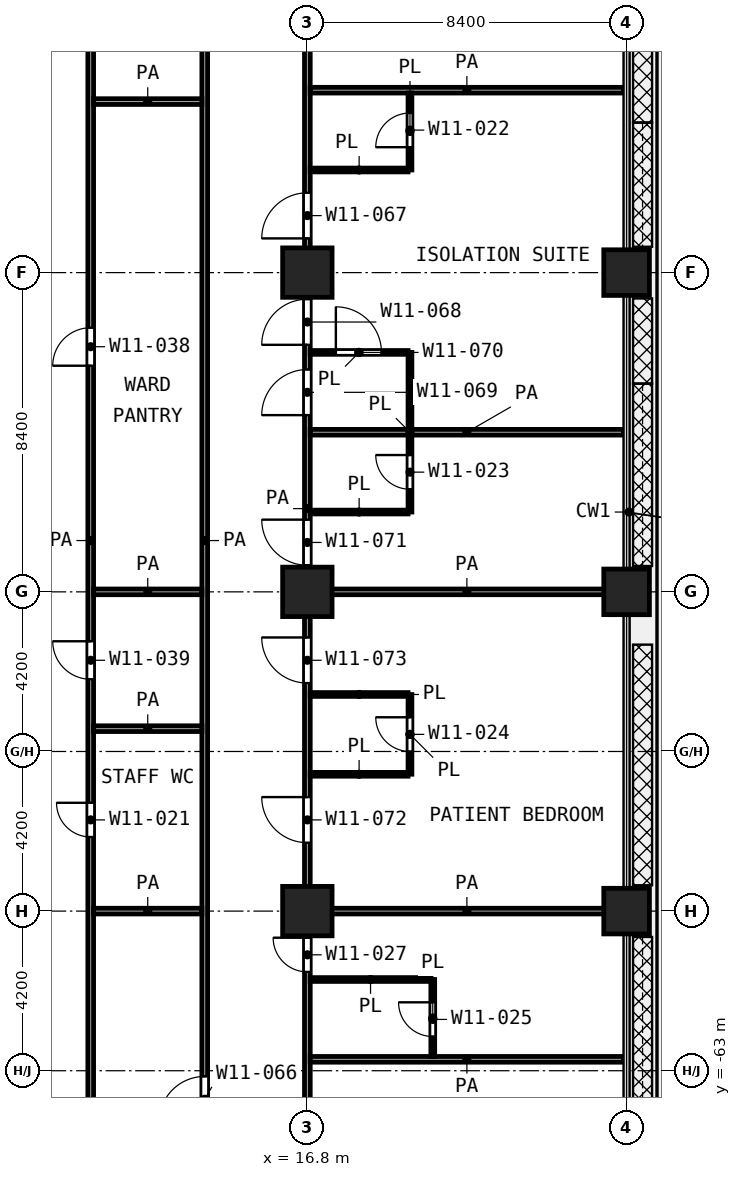
"""IFC4 building model, lengths in metres.
Left out: names, types, materials, properties, quantities, classifications, styles, units other than length and angle.
Written with IfcOpenShell. Run it as: python <this file> out.ifc"""

import sys

from ifc_helpers import new_model, si_unit, direction, frame, frame_2d, origin, origin_2d, place, context, subcontext, project, spatial, rectangle, extrude, element, fill, save


model = new_model("IFC4")
c1 = context("Model", 3, precision=1e-05, world=origin(), true_north=direction((0.0, 1.0)))
c2 = subcontext(c1, "Body", "Model", "MODEL_VIEW")
j1 = project(units=[si_unit("LENGTHUNIT", "METRE"), si_unit("PLANEANGLEUNIT", "RADIAN")], contexts=[c1])
p1 = place(None, origin())
s1 = spatial("IfcSite", under=j1, at=p1, CompositionType="ELEMENT")
p2 = place(p1, origin())
s2 = spatial("IfcBuilding", under=s1, at=p2, CompositionType="ELEMENT")
p3 = place(p2, frame((0.0, 0.0, 72.8)))
s3 = spatial("IfcBuildingStorey", under=s2, at=p3, CompositionType="ELEMENT", Elevation=72.8)
p4 = place(p3, frame((16.8, -42.0, 0.0), z_axis=(0.0, 0.0, 1.0), x_axis=(1.0, 0.0, 0.0)))
e1 = element("IfcColumn", 1, at=p4, inside=s3, PredefinedType="COLUMN", context=c2, shape_type="SweptSolid", body=[
    extrude(rectangle(XDim=1.3, YDim=1.3, at=origin_2d()), origin(), (0.0, 0.0, 1.0), 4.2),
])
p5 = place(p3, frame((25.2, -42.0, 0.0), z_axis=(0.0, 0.0, 1.0), x_axis=(1.0, 0.0, 0.0)))
e2 = element("IfcColumn", 2, at=p5, inside=s3, PredefinedType="COLUMN", context=c2, shape_type="SweptSolid", body=[
    extrude(rectangle(XDim=1.2, YDim=1.2, at=origin_2d()), origin(), (0.0, 0.0, 1.0), 4.2),
])
p6 = place(p3, frame((16.8, -50.4, 0.0), z_axis=(0.0, 0.0, 1.0), x_axis=(1.0, 0.0, 0.0)))
e3 = element("IfcColumn", 3, at=p6, inside=s3, PredefinedType="COLUMN", context=c2, shape_type="SweptSolid", body=[
    extrude(rectangle(XDim=1.3, YDim=1.3, at=origin_2d()), origin(), (0.0, 0.0, 1.0), 4.2),
])
p7 = place(p3, frame((25.2, -50.4, 0.0), z_axis=(0.0, 0.0, 1.0), x_axis=(1.0, 0.0, 0.0)))
e4 = element("IfcColumn", 4, at=p7, inside=s3, PredefinedType="COLUMN", context=c2, shape_type="SweptSolid", body=[
    extrude(rectangle(XDim=1.2, YDim=1.2, at=origin_2d()), origin(), (0.0, 0.0, 1.0), 4.2),
])
p8 = place(p3, frame((16.8, -58.8, 0.0), z_axis=(0.0, 0.0, 1.0), x_axis=(1.0, 0.0, 0.0)))
e5 = element("IfcColumn", 5, at=p8, inside=s3, PredefinedType="COLUMN", context=c2, shape_type="SweptSolid", body=[
    extrude(rectangle(XDim=1.3, YDim=1.3, at=origin_2d()), origin(), (0.0, 0.0, 1.0), 4.2),
])
p9 = place(p3, frame((25.2, -58.8, 0.0), z_axis=(0.0, 0.0, 1.0), x_axis=(1.0, 0.0, 0.0)))
e6 = element("IfcColumn", 6, at=p9, inside=s3, PredefinedType="COLUMN", context=c2, shape_type="SweptSolid", body=[
    extrude(rectangle(XDim=1.2, YDim=1.2, at=origin_2d()), origin(), (0.0, 0.0, 1.0), 4.2),
])
p10 = place(p3, frame((16.875, -60.6, 0.0), z_axis=(0.0, 0.0, 1.0), x_axis=(1.0, 0.0, 0.0)))
e7 = element("IfcWall", 7, at=p10, inside=s3, PredefinedType="PARTITIONING", context=c2, shape_type="SweptSolid", body=[
    extrude(rectangle(XDim=3.175, YDim=0.1, at=frame_2d((1.587, 0.0))), origin(), (0.0, 0.0, 1.0), 3.9),
])
p11 = place(p3, frame((16.875, -55.2, 0.0), z_axis=(0.0, 0.0, 1.0), x_axis=(1.0, 0.0, 0.0)))
e8 = element("IfcWall", 8, at=p11, inside=s3, PredefinedType="PARTITIONING", context=c2, shape_type="SweptSolid", body=[
    extrude(rectangle(XDim=2.573, YDim=0.1, at=frame_2d((1.287, 0.0))), origin(), (0.0, 0.0, 1.0), 3.9),
])
p12 = place(p3, frame((16.875, -53.1, 0.0), z_axis=(0.0, 0.0, 1.0), x_axis=(1.0, 0.0, 0.0)))
e9 = element("IfcWall", 9, at=p12, inside=s3, PredefinedType="PARTITIONING", context=c2, shape_type="SweptSolid", body=[
    extrude(rectangle(XDim=2.574, YDim=0.1, at=frame_2d((1.287, 0.0))), origin(), (0.0, 0.0, 1.0), 3.9),
])
p13 = place(p3, frame((16.875, -48.3, 0.0), z_axis=(0.0, 0.0, 1.0), x_axis=(1.0, 0.0, 0.0)))
e10 = element("IfcWall", 10, at=p13, inside=s3, PredefinedType="PARTITIONING", context=c2, shape_type="SweptSolid", body=[
    extrude(rectangle(XDim=2.575, YDim=0.1, at=frame_2d((1.288, 0.0))), origin(), (0.0, 0.0, 1.0), 3.9),
])
p14 = place(p3, frame((16.875, -44.1, 0.0), z_axis=(0.0, 0.0, 1.0), x_axis=(1.0, 0.0, 0.0)))
e11 = element("IfcWall", 11, at=p14, inside=s3, PredefinedType="PARTITIONING", context=c2, shape_type="SweptSolid", body=[
    extrude(rectangle(XDim=2.575, YDim=0.1, at=frame_2d((1.288, 0.0))), origin(), (0.0, 0.0, 1.0), 3.9),
])
p15 = place(p14, frame((0.675, 0.0, 0.0)))
e12 = element("IfcOpeningElement", 12, at=p15, cuts=e11, PredefinedType="OPENING", context=c2, shape_type="SweptSolid", body=[
    extrude(rectangle(XDim=1.2, YDim=2.1, at=frame_2d((0.6, 1.05))), frame((0.0, 0.06, 0.0), z_axis=(0.0, -1.0, 0.0), x_axis=(1.0, 0.0, 0.0)), (0.0, 0.0, 1.0), 0.12),
])
p16 = place(p3, frame((16.875, -39.3, 0.0), z_axis=(0.0, 0.0, 1.0), x_axis=(1.0, 0.0, 0.0)))
e13 = element("IfcWall", 13, at=p16, inside=s3, PredefinedType="PARTITIONING", context=c2, shape_type="SweptSolid", body=[
    extrude(rectangle(XDim=2.575, YDim=0.1, at=frame_2d((1.288, 0.0))), origin(), (0.0, 0.0, 1.0), 3.9),
])
p17 = place(p3, frame((19.5, -55.198, 0.0), z_axis=(0.0, 0.0, 1.0), x_axis=(0.0, 1.0, 0.0)))
e14 = element("IfcWall", 14, at=p17, inside=s3, PredefinedType="PARTITIONING", context=c2, shape_type="SweptSolid", body=[
    extrude(rectangle(XDim=2.096, YDim=0.1, at=frame_2d((1.048, 0.0))), origin(), (0.0, 0.0, 1.0), 3.9),
])
p18 = place(p17, frame((0.598, 0.0, 0.0)))
e15 = element("IfcOpeningElement", 15, at=p18, cuts=e14, PredefinedType="OPENING", context=c2, shape_type="SweptSolid", body=[
    extrude(rectangle(XDim=0.9, YDim=2.1, at=frame_2d((0.45, 1.05))), frame((0.0, 0.06, 0.0), z_axis=(0.0, -1.0, 0.0), x_axis=(1.0, 0.0, 0.0)), (0.0, 0.0, 1.0), 0.12),
])
p19 = place(p3, frame((19.5, -48.3, 0.0), z_axis=(0.0, 0.0, 1.0), x_axis=(0.0, 1.0, 0.0)))
e16 = element("IfcWall", 16, at=p19, inside=s3, PredefinedType="PARTITIONING", context=c2, shape_type="SweptSolid", body=[
    extrude(rectangle(XDim=4.2, YDim=0.1, at=frame_2d((2.1, 0.0))), origin(), (0.0, 0.0, 1.0), 3.9),
])
p20 = place(p19, frame((0.6, 0.0, 0.0)))
e17 = element("IfcOpeningElement", 17, at=p20, cuts=e16, PredefinedType="OPENING", context=c2, shape_type="SweptSolid", body=[
    extrude(rectangle(XDim=0.9, YDim=2.1, at=frame_2d((0.45, 1.05))), frame((0.0, 0.06, 0.0), z_axis=(0.0, -1.0, 0.0), x_axis=(1.0, 0.0, 0.0)), (0.0, 0.0, 1.0), 0.12),
])
p21 = place(p3, frame((19.5, -39.3, 0.0), z_axis=(0.0, 0.0, 1.0), x_axis=(0.0, 1.0, 0.0)))
e18 = element("IfcWall", 18, at=p21, inside=s3, PredefinedType="PARTITIONING", context=c2, shape_type="SweptSolid", body=[
    extrude(rectangle(XDim=2.025, YDim=0.1, at=frame_2d((1.013, 0.0))), origin(), (0.0, 0.0, 1.0), 3.9),
])
p22 = place(p21, frame((0.6, 0.0, 0.0)))
e19 = element("IfcOpeningElement", 19, at=p22, cuts=e18, PredefinedType="OPENING", context=c2, shape_type="SweptSolid", body=[
    extrude(rectangle(XDim=0.9, YDim=2.1, at=frame_2d((0.45, 1.05))), frame((0.0, 0.06, 0.0), z_axis=(0.0, -1.0, 0.0), x_axis=(1.0, 0.0, 0.0)), (0.0, 0.0, 1.0), 0.12),
])
p23 = place(p3, frame((20.1, -62.625, 0.0), z_axis=(0.0, 0.0, 1.0), x_axis=(0.0, 1.0, 0.0)))
e20 = element("IfcWall", 20, at=p23, inside=s3, PredefinedType="PARTITIONING", context=c2, shape_type="SweptSolid", body=[
    extrude(rectangle(XDim=2.025, YDim=0.1, at=frame_2d((1.012, 0.0))), origin(), (0.0, 0.0, 1.0), 3.9),
])
p24 = place(p23, frame((0.525, 0.0, 0.0)))
e21 = element("IfcOpeningElement", 21, at=p24, cuts=e20, PredefinedType="OPENING", context=c2, shape_type="SweptSolid", body=[
    extrude(rectangle(XDim=0.9, YDim=2.1, at=frame_2d((0.45, 1.05))), frame((0.0, 0.06, 0.0), z_axis=(0.0, -1.0, 0.0), x_axis=(1.0, 0.0, 0.0)), (0.0, 0.0, 1.0), 0.12),
])
p25 = place(p3, frame((16.875, -62.7, 0.0), z_axis=(0.0, 0.0, 1.0), x_axis=(1.0, 0.0, 0.0)))
e22 = element("IfcWall", 22, at=p25, inside=s3, PredefinedType="PARTITIONING", context=c2, shape_type="SweptSolid", body=[
    extrude(rectangle(XDim=8.245, YDim=0.15, at=frame_2d((4.123, 0.0))), origin(), (0.0, 0.0, 1.0), 3.9),
])
p26 = place(p3, frame((11.175, -58.8, 0.0), z_axis=(0.0, 0.0, 1.0), x_axis=(1.0, 0.0, 0.0)))
e23 = element("IfcWall", 23, at=p26, inside=s3, PredefinedType="PARTITIONING", context=c2, shape_type="SweptSolid", body=[
    extrude(rectangle(XDim=2.85, YDim=0.15, at=frame_2d((1.425, 0.0))), origin(), (0.0, 0.0, 1.0), 3.9),
])
p27 = place(p3, frame((16.875, -58.8, 0.0), z_axis=(0.0, 0.0, 1.0), x_axis=(1.0, 0.0, 0.0)))
e24 = element("IfcWall", 24, at=p27, inside=s3, PredefinedType="PARTITIONING", context=c2, shape_type="SweptSolid", body=[
    extrude(rectangle(XDim=8.245, YDim=0.15, at=frame_2d((4.123, 0.0))), origin(), (0.0, 0.0, 1.0), 3.9),
])
for number, where, z_axis, x_axis in (
    (25, (11.175, -54.0, 0.0), (0.0, 0.0, 1.0), (1.0, 0.0, 0.0)),
    (26, (11.175, -50.4, 0.0), (0.0, 0.0, 1.0), (1.0, 0.0, 0.0)),
):
    element("IfcWall", number, at=place(p3, frame(where, z_axis=z_axis, x_axis=x_axis)), inside=s3, PredefinedType="PARTITIONING", context=c2, shape_type="SweptSolid", body=[
        extrude(rectangle(XDim=2.85, YDim=0.15, at=frame_2d((1.425, 0.0))), origin(), (0.0, 0.0, 1.0), 3.9),
    ])
for number, where, z_axis, x_axis in (
    (27, (16.875, -50.4, 0.0), (0.0, 0.0, 1.0), (1.0, 0.0, 0.0)),
    (28, (16.875, -46.2, 0.0), (0.0, 0.0, 1.0), (1.0, 0.0, 0.0)),
):
    element("IfcWall", number, at=place(p3, frame(where, z_axis=z_axis, x_axis=x_axis)), inside=s3, PredefinedType="PARTITIONING", context=c2, shape_type="SweptSolid", body=[
        extrude(rectangle(XDim=8.245, YDim=0.15, at=frame_2d((4.123, 0.0))), origin(), (0.0, 0.0, 1.0), 3.9),
    ])
p28 = place(p3, frame((11.175, -37.5, 0.0), z_axis=(0.0, 0.0, 1.0), x_axis=(1.0, 0.0, 0.0)))
e29 = element("IfcWall", 29, at=p28, inside=s3, PredefinedType="PARTITIONING", context=c2, shape_type="SweptSolid", body=[
    extrude(rectangle(XDim=2.85, YDim=0.15, at=frame_2d((1.425, 0.0))), origin(), (0.0, 0.0, 1.0), 3.9),
])
p29 = place(p3, frame((16.875, -37.2, 0.0), z_axis=(0.0, 0.0, 1.0), x_axis=(1.0, 0.0, 0.0)))
e30 = element("IfcWall", 30, at=p29, inside=s3, PredefinedType="PARTITIONING", context=c2, shape_type="SweptSolid", body=[
    extrude(rectangle(XDim=8.245, YDim=0.15, at=frame_2d((4.123, 0.0))), origin(), (0.0, 0.0, 1.0), 3.9),
])
p30 = place(p3, frame((11.1, -68.7, 0.0), z_axis=(0.0, 0.0, 1.0), x_axis=(0.0, 1.0, 0.0)))
e31 = element("IfcWall", 31, at=p30, inside=s3, PredefinedType="PARTITIONING", context=c2, shape_type="SweptSolid", body=[
    extrude(rectangle(XDim=39.3, YDim=0.15, at=frame_2d((19.65, 0.0))), origin(), (0.0, 0.0, 1.0), 3.9),
])
p31 = place(p30, frame((34.75, 0.0, 0.0)))
e32 = element("IfcOpeningElement", 32, at=p31, cuts=e31, PredefinedType="OPENING", context=c2, shape_type="SweptSolid", body=[
    extrude(rectangle(XDim=1.0, YDim=2.1, at=frame_2d((0.5, 1.05))), frame((0.0, 0.085, 0.0), z_axis=(0.0, -1.0, 0.0), x_axis=(1.0, 0.0, 0.0)), (0.0, 0.0, 1.0), 0.17),
])
p32 = place(p30, frame((24.25, 0.0, 0.0)))
e33 = element("IfcOpeningElement", 33, at=p32, cuts=e31, PredefinedType="OPENING", context=c2, shape_type="SweptSolid", body=[
    extrude(rectangle(XDim=1.0, YDim=2.1, at=frame_2d((0.5, 1.05))), frame((0.0, 0.085, 0.0), z_axis=(0.0, -1.0, 0.0), x_axis=(1.0, 0.0, 0.0)), (0.0, 0.0, 1.0), 0.17),
])
p33 = place(p30, frame((16.0, 0.0, 0.0)))
e34 = element("IfcOpeningElement", 34, at=p33, cuts=e31, PredefinedType="OPENING", context=c2, shape_type="SweptSolid", body=[
    extrude(rectangle(XDim=1.0, YDim=2.1, at=frame_2d((0.5, 1.05))), frame((0.0, 0.085, 0.0), z_axis=(0.0, -1.0, 0.0), x_axis=(1.0, 0.0, 0.0)), (0.0, 0.0, 1.0), 0.17),
])
p34 = place(p30, frame((11.85, 0.0, 0.0)))
e35 = element("IfcOpeningElement", 35, at=p34, cuts=e31, PredefinedType="OPENING", context=c2, shape_type="SweptSolid", body=[
    extrude(rectangle(XDim=0.9, YDim=2.1, at=frame_2d((0.45, 1.05))), frame((0.0, 0.085, 0.0), z_axis=(0.0, -1.0, 0.0), x_axis=(1.0, 0.0, 0.0)), (0.0, 0.0, 1.0), 0.17),
])
p35 = place(p3, frame((14.1, -68.7, 0.0), z_axis=(0.0, 0.0, 1.0), x_axis=(0.0, 1.0, 0.0)))
e36 = element("IfcWall", 36, at=p35, inside=s3, PredefinedType="PARTITIONING", context=c2, shape_type="SweptSolid", body=[
    extrude(rectangle(XDim=39.3, YDim=0.15, at=frame_2d((19.65, 0.0))), origin(), (0.0, 0.0, 1.0), 3.9),
])
p36 = place(p35, frame((4.35, 0.0, 0.0)))
e37 = element("IfcOpeningElement", 37, at=p36, cuts=e36, PredefinedType="OPENING", context=c2, shape_type="SweptSolid", body=[
    extrude(rectangle(XDim=1.2, YDim=2.1, at=frame_2d((0.6, 1.05))), frame((0.0, 0.085, 0.0), z_axis=(0.0, -1.0, 0.0), x_axis=(1.0, 0.0, 0.0)), (0.0, 0.0, 1.0), 0.17),
])
p37 = place(p3, frame((16.8, -71.32, 0.0), z_axis=(0.0, 0.0, 1.0), x_axis=(0.0, 1.0, 0.0)))
e38 = element("IfcWall", 38, at=p37, inside=s3, PredefinedType="PARTITIONING", context=c2, shape_type="SweptSolid", body=[
    extrude(rectangle(XDim=46.22, YDim=0.15, at=frame_2d((23.11, 0.0))), origin(), (0.0, 0.0, 1.0), 3.9),
])
p38 = place(p37, frame((38.42, 0.0, 0.0)))
e39 = element("IfcOpeningElement", 39, at=p38, cuts=e38, PredefinedType="OPENING", context=c2, shape_type="SweptSolid", body=[
    extrude(rectangle(XDim=1.0, YDim=2.1, at=frame_2d((0.5, 1.05))), frame((0.0, 0.085, 0.0), z_axis=(0.0, -1.0, 0.0), x_axis=(1.0, 0.0, 0.0)), (0.0, 0.0, 1.0), 0.17),
])
p39 = place(p37, frame((30.22, 0.0, 0.0)))
e40 = element("IfcOpeningElement", 40, at=p39, cuts=e38, PredefinedType="OPENING", context=c2, shape_type="SweptSolid", body=[
    extrude(rectangle(XDim=1.2, YDim=2.1, at=frame_2d((0.6, 1.05))), frame((0.0, 0.085, 0.0), z_axis=(0.0, -1.0, 0.0), x_axis=(1.0, 0.0, 0.0)), (0.0, 0.0, 1.0), 0.17),
])
p40 = place(p37, frame((27.42, 0.0, 0.0)))
e41 = element("IfcOpeningElement", 41, at=p40, cuts=e38, PredefinedType="OPENING", context=c2, shape_type="SweptSolid", body=[
    extrude(rectangle(XDim=1.2, YDim=2.1, at=frame_2d((0.6, 1.05))), frame((0.0, 0.085, 0.0), z_axis=(0.0, -1.0, 0.0), x_axis=(1.0, 0.0, 0.0)), (0.0, 0.0, 1.0), 0.17),
])
p41 = place(p37, frame((25.57, 0.0, 0.0)))
e42 = element("IfcOpeningElement", 42, at=p41, cuts=e38, PredefinedType="OPENING", context=c2, shape_type="SweptSolid", body=[
    extrude(rectangle(XDim=1.2, YDim=2.1, at=frame_2d((0.6, 1.05))), frame((0.0, 0.085, 0.0), z_axis=(0.0, -1.0, 0.0), x_axis=(1.0, 0.0, 0.0)), (0.0, 0.0, 1.0), 0.17),
])
p42 = place(p37, frame((21.62, 0.0, 0.0)))
e43 = element("IfcOpeningElement", 43, at=p42, cuts=e38, PredefinedType="OPENING", context=c2, shape_type="SweptSolid", body=[
    extrude(rectangle(XDim=1.2, YDim=2.1, at=frame_2d((0.6, 1.05))), frame((0.0, 0.085, 0.0), z_axis=(0.0, -1.0, 0.0), x_axis=(1.0, 0.0, 0.0)), (0.0, 0.0, 1.0), 0.17),
])
p43 = place(p37, frame((14.32, 0.0, 0.0)))
e44 = element("IfcOpeningElement", 44, at=p43, cuts=e38, PredefinedType="OPENING", context=c2, shape_type="SweptSolid", body=[
    extrude(rectangle(XDim=1.2, YDim=2.1, at=frame_2d((0.6, 1.05))), frame((0.0, 0.085, 0.0), z_axis=(0.0, -1.0, 0.0), x_axis=(1.0, 0.0, 0.0)), (0.0, 0.0, 1.0), 0.17),
])
p44 = place(p37, frame((18.52, 0.0, 0.0)))
e45 = element("IfcOpeningElement", 45, at=p44, cuts=e38, PredefinedType="OPENING", context=c2, shape_type="SweptSolid", body=[
    extrude(rectangle(XDim=1.2, YDim=2.1, at=frame_2d((0.6, 1.05))), frame((0.0, 0.085, 0.0), z_axis=(0.0, -1.0, 0.0), x_axis=(1.0, 0.0, 0.0)), (0.0, 0.0, 1.0), 0.17),
])
p45 = place(p37, frame((10.92, 0.0, 0.0)))
e46 = element("IfcOpeningElement", 46, at=p45, cuts=e38, PredefinedType="OPENING", context=c2, shape_type="SweptSolid", body=[
    extrude(rectangle(XDim=0.9, YDim=2.1, at=frame_2d((0.45, 1.05))), frame((0.0, 0.085, 0.0), z_axis=(0.0, -1.0, 0.0), x_axis=(1.0, 0.0, 0.0)), (0.0, 0.0, 1.0), 0.17),
])
p46 = place(p37, frame((4.82, 0.0, 0.0)))
e47 = element("IfcOpeningElement", 47, at=p46, cuts=e38, PredefinedType="OPENING", context=c2, shape_type="SweptSolid", body=[
    extrude(rectangle(XDim=1.5, YDim=2.1, at=frame_2d((0.75, 1.05))), frame((0.0, 0.085, 0.0), z_axis=(0.0, -1.0, 0.0), x_axis=(1.0, 0.0, 0.0)), (0.0, 0.0, 1.0), 0.17),
])
p47 = place(p32, origin())
e48 = element("IfcDoor", 48, at=p47, inside=s3, OperationType="SINGLE_SWING_LEFT", PredefinedType="DOOR", context=c2, shape_type="SweptSolid", body=[
    extrude(rectangle(XDim=1.0, YDim=2.1, at=frame_2d((0.5, 1.05))), frame((0.0, 0.025, 0.0), z_axis=(0.0, -1.0, 0.0), x_axis=(1.0, 0.0, 0.0)), (0.0, 0.0, 1.0), 0.05),
])
fill(e33, e48)
p48 = place(p33, origin())
e49 = element("IfcDoor", 49, at=p48, inside=s3, OperationType="SINGLE_SWING_RIGHT", PredefinedType="DOOR", context=c2, shape_type="SweptSolid", body=[
    extrude(rectangle(XDim=1.0, YDim=2.1, at=frame_2d((0.5, 1.05))), frame((0.0, 0.025, 0.0), z_axis=(0.0, -1.0, 0.0), x_axis=(1.0, 0.0, 0.0)), (0.0, 0.0, 1.0), 0.05),
])
fill(e34, e49)
p49 = place(p34, origin())
e50 = element("IfcDoor", 50, at=p49, inside=s3, OperationType="SINGLE_SWING_RIGHT", PredefinedType="DOOR", context=c2, shape_type="SweptSolid", body=[
    extrude(rectangle(XDim=0.9, YDim=2.1, at=frame_2d((0.45, 1.05))), frame((0.0, 0.025, 0.0), z_axis=(0.0, -1.0, 0.0), x_axis=(1.0, 0.0, 0.0)), (0.0, 0.0, 1.0), 0.05),
])
fill(e35, e50)
p50 = place(p36, origin())
e51 = element("IfcDoor", 51, at=p50, inside=s3, OperationType="SINGLE_SWING_LEFT", PredefinedType="DOOR", context=c2, shape_type="SweptSolid", body=[
    extrude(rectangle(XDim=1.2, YDim=2.1, at=frame_2d((0.6, 1.05))), frame((0.0, 0.025, 0.0), z_axis=(0.0, -1.0, 0.0), x_axis=(1.0, 0.0, 0.0)), (0.0, 0.0, 1.0), 0.05),
])
fill(e37, e51)
p51 = place(p39, origin())
e52 = element("IfcDoor", 52, at=p51, inside=s3, OperationType="SINGLE_SWING_LEFT", PredefinedType="DOOR", context=c2, shape_type="SweptSolid", body=[
    extrude(rectangle(XDim=1.2, YDim=2.1, at=frame_2d((0.6, 1.05))), frame((0.0, 0.025, 0.0), z_axis=(0.0, -1.0, 0.0), x_axis=(1.0, 0.0, 0.0)), (0.0, 0.0, 1.0), 0.05),
])
fill(e40, e52)
p52 = place(p40, origin())
e53 = element("IfcDoor", 53, at=p52, inside=s3, OperationType="SINGLE_SWING_LEFT", PredefinedType="DOOR", context=c2, shape_type="SweptSolid", body=[
    extrude(rectangle(XDim=1.2, YDim=2.1, at=frame_2d((0.6, 1.05))), frame((0.0, 0.025, 0.0), z_axis=(0.0, -1.0, 0.0), x_axis=(1.0, 0.0, 0.0)), (0.0, 0.0, 1.0), 0.05),
])
fill(e41, e53)
p53 = place(p41, origin())
e54 = element("IfcDoor", 54, at=p53, inside=s3, OperationType="SINGLE_SWING_LEFT", PredefinedType="DOOR", context=c2, shape_type="SweptSolid", body=[
    extrude(rectangle(XDim=1.2, YDim=2.1, at=frame_2d((0.6, 1.05))), frame((0.0, 0.025, 0.0), z_axis=(0.0, -1.0, 0.0), x_axis=(1.0, 0.0, 0.0)), (0.0, 0.0, 1.0), 0.05),
])
fill(e42, e54)
p54 = place(p15, origin())
e55 = element("IfcDoor", 55, at=p54, inside=s3, OperationType="SINGLE_SWING_LEFT", PredefinedType="DOOR", context=c2, shape_type="SweptSolid", body=[
    extrude(rectangle(XDim=1.2, YDim=2.1, at=frame_2d((0.6, 1.05))), frame((0.0, 0.025, 0.0), z_axis=(0.0, -1.0, 0.0), x_axis=(1.0, 0.0, 0.0)), (0.0, 0.0, 1.0), 0.05),
])
fill(e12, e55)
p55 = place(p22, origin())
e56 = element("IfcDoor", 56, at=p55, inside=s3, OperationType="SINGLE_SWING_LEFT", PredefinedType="DOOR", context=c2, shape_type="SweptSolid", body=[
    extrude(rectangle(XDim=0.9, YDim=2.1, at=frame_2d((0.45, 1.05))), frame((0.0, 0.025, 0.0), z_axis=(0.0, -1.0, 0.0), x_axis=(1.0, 0.0, 0.0)), (0.0, 0.0, 1.0), 0.05),
])
fill(e19, e56)
p56 = place(p42, origin())
e57 = element("IfcDoor", 57, at=p56, inside=s3, OperationType="SINGLE_SWING_RIGHT", PredefinedType="DOOR", context=c2, shape_type="SweptSolid", body=[
    extrude(rectangle(XDim=1.2, YDim=2.1, at=frame_2d((0.6, 1.05))), frame((0.0, 0.025, 0.0), z_axis=(0.0, -1.0, 0.0), x_axis=(1.0, 0.0, 0.0)), (0.0, 0.0, 1.0), 0.05),
])
fill(e43, e57)
p57 = place(p20, origin())
e58 = element("IfcDoor", 58, at=p57, inside=s3, OperationType="SINGLE_SWING_RIGHT", PredefinedType="DOOR", context=c2, shape_type="SweptSolid", body=[
    extrude(rectangle(XDim=0.9, YDim=2.1, at=frame_2d((0.45, 1.05))), frame((0.0, 0.025, 0.0), z_axis=(0.0, -1.0, 0.0), x_axis=(1.0, 0.0, 0.0)), (0.0, 0.0, 1.0), 0.05),
])
fill(e17, e58)
p58 = place(p43, origin())
e59 = element("IfcDoor", 59, at=p58, inside=s3, OperationType="SINGLE_SWING_RIGHT", PredefinedType="DOOR", context=c2, shape_type="SweptSolid", body=[
    extrude(rectangle(XDim=1.2, YDim=2.1, at=frame_2d((0.6, 1.05))), frame((0.0, 0.025, 0.0), z_axis=(0.0, -1.0, 0.0), x_axis=(1.0, 0.0, 0.0)), (0.0, 0.0, 1.0), 0.05),
])
fill(e44, e59)
p59 = place(p44, origin())
e60 = element("IfcDoor", 60, at=p59, inside=s3, OperationType="SINGLE_SWING_RIGHT", PredefinedType="DOOR", context=c2, shape_type="SweptSolid", body=[
    extrude(rectangle(XDim=1.2, YDim=2.1, at=frame_2d((0.6, 1.05))), frame((0.0, 0.025, 0.0), z_axis=(0.0, -1.0, 0.0), x_axis=(1.0, 0.0, 0.0)), (0.0, 0.0, 1.0), 0.05),
])
fill(e45, e60)
p60 = place(p18, origin())
e61 = element("IfcDoor", 61, at=p60, inside=s3, OperationType="SINGLE_SWING_RIGHT", PredefinedType="DOOR", context=c2, shape_type="SweptSolid", body=[
    extrude(rectangle(XDim=0.9, YDim=2.1, at=frame_2d((0.45, 1.05))), frame((0.0, 0.025, 0.0), z_axis=(0.0, -1.0, 0.0), x_axis=(1.0, 0.0, 0.0)), (0.0, 0.0, 1.0), 0.05),
])
fill(e15, e61)
p61 = place(p45, origin())
e62 = element("IfcDoor", 62, at=p61, inside=s3, OperationType="SINGLE_SWING_RIGHT", PredefinedType="DOOR", context=c2, shape_type="SweptSolid", body=[
    extrude(rectangle(XDim=0.9, YDim=2.1, at=frame_2d((0.45, 1.05))), frame((0.0, 0.025, 0.0), z_axis=(0.0, -1.0, 0.0), x_axis=(1.0, 0.0, 0.0)), (0.0, 0.0, 1.0), 0.05),
])
fill(e46, e62)
p62 = place(p24, origin())
e63 = element("IfcDoor", 63, at=p62, inside=s3, OperationType="SINGLE_SWING_RIGHT", PredefinedType="DOOR", context=c2, shape_type="SweptSolid", body=[
    extrude(rectangle(XDim=0.9, YDim=2.1, at=frame_2d((0.45, 1.05))), frame((0.0, 0.025, 0.0), z_axis=(0.0, -1.0, 0.0), x_axis=(1.0, 0.0, 0.0)), (0.0, 0.0, 1.0), 0.05),
])
fill(e21, e63)
save(model, sys.argv[1])
